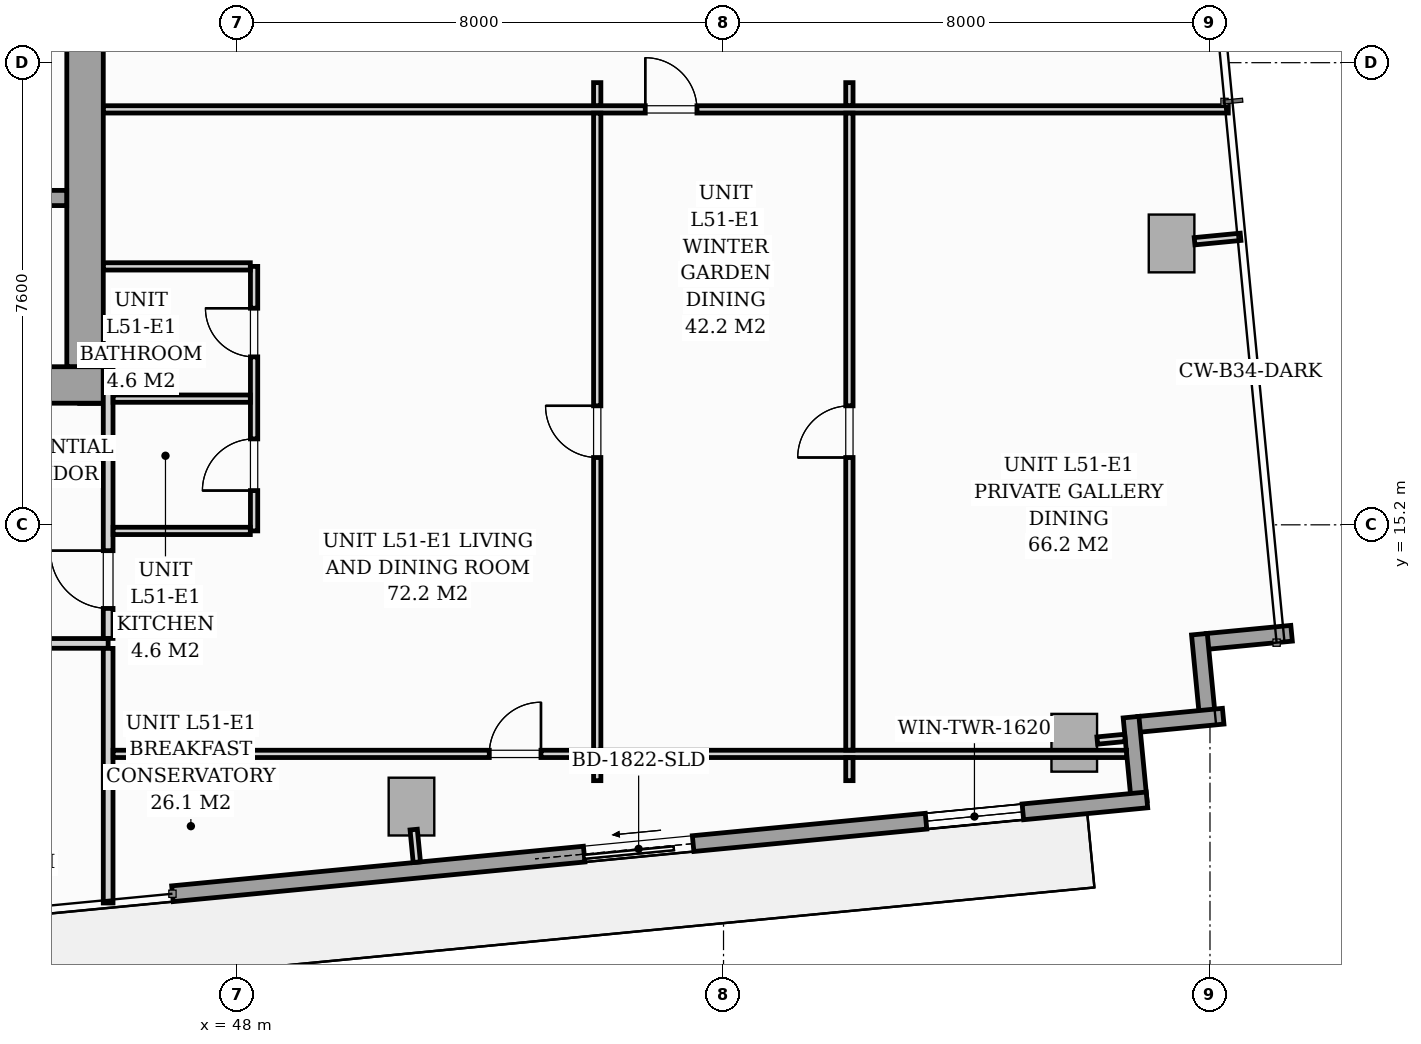
"""IFC4 building model, lengths in metres.
Left out: names, types, materials, properties, quantities, classifications, styles, units other than length and angle.
Written with IfcOpenShell. Run it as: python <this file> out.ifc"""

import sys

from ifc_helpers import new_model, si_unit, direction, frame, frame_2d, origin, origin_2d, place, context, subcontext, project, spatial, rectangle, i_section, extrude, source, transform, mapped, element, fill, save


model = new_model("IFC4")
c1 = context("Model", 3, precision=1e-05, world=origin(), true_north=direction((0.0, 1.0)))
c2 = subcontext(c1, "Body", "Model", "MODEL_VIEW")
j1 = project(units=[si_unit("LENGTHUNIT", "METRE"), si_unit("PLANEANGLEUNIT", "RADIAN")], contexts=[c1])
p1 = place(None, origin())
s1 = spatial("IfcSite", under=j1, at=p1, CompositionType="ELEMENT")
p2 = place(p1, origin())
s2 = spatial("IfcBuilding", under=s1, at=p2, CompositionType="ELEMENT")
p3 = place(p2, frame((0.0, 0.0, 179.4)))
s3 = spatial("IfcBuildingStorey", under=s2, at=p3, CompositionType="ELEMENT", Elevation=179.4)
m1 = source(origin(), c2, "Body", "SweptSolid", [
    extrude(i_section(OverallWidth=0.416, OverallDepth=0.446, WebThickness=0.039, FlangeThickness=0.063, FilletRadius=0.018, at=origin_2d()), origin(), (0.0, 0.0, 1.0), 3.196),
])
p4 = place(p3, frame((45.6, 17.4, 0.002), z_axis=(0.0, 0.0, 1.0), x_axis=(1.0, 0.0, 0.0)))
e1 = element("IfcColumn", 1, at=p4, inside=s3, PredefinedType="PILASTER", context=c2, shape_type="MappedRepresentation", body=[
    mapped(m1, transform((0.0, 0.0, 0.0), scale=1.0)),
])
m2 = source(origin(), c2, "Body", "SweptSolid", [
    extrude(rectangle(XDim=0.75, YDim=0.95, at=origin_2d()), origin(), (0.0, 0.0, 1.0), 3.196),
])
for number, where, z_axis, x_axis in (
    (2, (50.868, 10.566, 0.002), (0.0, 0.0, 1.0), (0.995, 0.096, 0.0)),
    (3, (61.768, 11.616, 0.002), (0.0, 0.0, 1.0), (0.995, 0.096, 0.0)),
    (4, (63.368, 19.827, 0.002), (0.0, 0.0, 1.0), (0.995, 0.096, 0.0)),
):
    element("IfcColumn", number, at=place(p3, frame(where, z_axis=z_axis, x_axis=x_axis)), inside=s3, PredefinedType="COLUMN", context=c2, shape_type="MappedRepresentation", body=[
        mapped(m2, transform((0.0, 0.0, 0.0), scale=1.0)),
    ])
p5 = place(p3, frame((65.342, 13.417, 0.0), z_axis=(0.0, 0.0, 1.0), x_axis=(-0.99540774648, -0.095725744959, 0.0)))
e5 = element("IfcWall", 5, at=p5, inside=s3, PredefinedType="STANDARD", context=c2, shape_type="SweptSolid", body=[
    extrude(rectangle(XDim=1.395, YDim=0.26, at=frame_2d((0.698, 0.0))), origin(), (0.0, 0.0, 1.0), 2.94),
])
p6 = place(p3, frame((63.826, 13.401, 0.0), z_axis=(0.0, 0.0, 1.0), x_axis=(0.095915846097, -0.995389446633, 0.0)))
e6 = element("IfcWall", 6, at=p6, inside=s3, PredefinedType="STANDARD", context=c2, shape_type="SweptSolid", body=[
    extrude(rectangle(XDim=1.395, YDim=0.26, at=frame_2d((0.697, 0.0))), origin(), (0.0, 0.0, 1.0), 2.94),
])
for number, where, z_axis, x_axis in (
    (7, (64.217, 12.053, 0.0), (0.0, 0.0, 1.0), (-0.995, -0.096, 0.0)),
    (8, (62.702, 12.037, 0.0), (0.0, 0.0, 1.0), (0.096, -0.995, 0.0)),
):
    element("IfcWall", number, at=place(p3, frame(where, z_axis=z_axis, x_axis=x_axis)), inside=s3, PredefinedType="STANDARD", context=c2, shape_type="SweptSolid", body=[
        extrude(rectangle(XDim=1.395, YDim=0.26, at=frame_2d((0.698, 0.0))), origin(), (0.0, 0.0, 1.0), 2.94),
    ])
p7 = place(p3, frame((62.963, 10.676, 0.0), z_axis=(0.0, 0.0, 1.0), x_axis=(-0.995395627913, -0.095851676732, 0.0)))
e9 = element("IfcWall", 9, at=p7, inside=s3, PredefinedType="STANDARD", context=c2, shape_type="SweptSolid", body=[
    extrude(rectangle(XDim=16.1, YDim=0.26, at=frame_2d((8.05, 0.0))), origin(), (0.0, 0.0, 1.0), 2.94),
])
p8 = place(p7, frame((7.498, 0.0, 0.0)))
e10 = element("IfcOpeningElement", 10, at=p8, cuts=e9, PredefinedType="OPENING", context=c2, shape_type="SweptSolid", body=[
    extrude(rectangle(XDim=1.8, YDim=2.06, at=frame_2d((0.9, 1.03))), frame((0.0, 0.14, 0.0), z_axis=(0.0, -1.0, 0.0), x_axis=(1.0, 0.0, 0.0)), (0.0, 0.0, 1.0), 0.28),
])
p9 = place(p7, frame((2.05, 0.0, 0.65)))
e11 = element("IfcOpeningElement", 11, at=p9, cuts=e9, PredefinedType="OPENING", context=c2, shape_type="SweptSolid", body=[
    extrude(rectangle(XDim=1.6, YDim=1.5, at=frame_2d((0.8, 0.75))), frame((0.0, 0.14, 0.0), z_axis=(0.0, -1.0, 0.0), x_axis=(1.0, 0.0, 0.0)), (0.0, 0.0, 1.0), 0.28),
])
p10 = place(p3, frame((26.2, 17.5, 0.0), z_axis=(0.0, 0.0, 1.0), x_axis=(1.0, 0.0, 0.0)))
e12 = element("IfcWall", 12, at=p10, inside=s3, PredefinedType="SHEAR", context=c2, shape_type="SweptSolid", body=[
    extrude(rectangle(XDim=19.6, YDim=0.6, at=frame_2d((9.8, 0.0))), origin(), (0.0, 0.0, 1.0), 3.2),
])
p11 = place(p10, frame((0.95, 0.0, 0.0)))
e13 = element("IfcOpeningElement", 13, at=p11, cuts=e12, PredefinedType="OPENING", context=c2, shape_type="SweptSolid", body=[
    extrude(rectangle(XDim=0.95, YDim=2.06, at=frame_2d((0.475, 1.03))), frame((0.0, 0.31, 0.0), z_axis=(0.0, -1.0, 0.0), x_axis=(1.0, 0.0, 0.0)), (0.0, 0.0, 1.0), 0.62),
])
p12 = place(p10, frame((9.38, 0.0, 0.0)))
e14 = element("IfcOpeningElement", 14, at=p12, cuts=e12, PredefinedType="OPENING", context=c2, shape_type="SweptSolid", body=[
    extrude(rectangle(XDim=0.85, YDim=2.0, at=frame_2d((0.425, 1.0))), frame((0.0, 0.31, 0.0), z_axis=(0.0, -1.0, 0.0), x_axis=(1.0, 0.0, 0.0)), (0.0, 0.0, 1.0), 0.62),
])
p13 = place(p10, frame((17.55, 0.0, 0.0)))
e15 = element("IfcOpeningElement", 15, at=p13, cuts=e12, PredefinedType="OPENING", context=c2, shape_type="SweptSolid", body=[
    extrude(rectangle(XDim=0.95, YDim=2.06, at=frame_2d((0.475, 1.03))), frame((0.0, 0.31, 0.0), z_axis=(0.0, -1.0, 0.0), x_axis=(1.0, 0.0, 0.0)), (0.0, 0.0, 1.0), 0.62),
])
p14 = place(p3, frame((45.5, 17.802, 0.0), z_axis=(0.0, 0.0, 1.0), x_axis=(0.0, 1.0, 0.0)))
e16 = element("IfcWall", 16, at=p14, inside=s3, PredefinedType="SHEAR", context=c2, shape_type="SweptSolid", body=[
    extrude(rectangle(XDim=5.796, YDim=0.6, at=frame_2d((2.898, 0.0))), origin(), (0.0, 0.0, 1.0), 3.2),
])
p15 = place(p3, frame((37.05, 20.575, 0.0), z_axis=(0.0, 0.0, 1.0), x_axis=(1.0, 0.0, 0.0)))
e17 = element("IfcWall", 17, at=p15, inside=s3, PredefinedType="SOLIDWALL", context=c2, shape_type="SweptSolid", body=[
    extrude(rectangle(XDim=8.148, YDim=0.25, at=frame_2d((4.074, 0.0))), origin(), (0.0, 0.0, 1.0), 3.2),
])
p16 = place(p15, frame((6.6, 0.0, 0.0)))
e18 = element("IfcOpeningElement", 18, at=p16, cuts=e17, PredefinedType="OPENING", context=c2, shape_type="SweptSolid", body=[
    extrude(rectangle(XDim=0.95, YDim=2.06, at=frame_2d((0.475, 1.03))), frame((0.0, 0.135, 0.0), z_axis=(0.0, -1.0, 0.0), x_axis=(1.0, 0.0, 0.0)), (0.0, 0.0, 1.0), 0.27),
])
p17 = place(p3, frame((22.6, 13.25, 0.0), z_axis=(0.0, 0.0, 1.0), x_axis=(1.0, 0.0, 0.0)))
e19 = element("IfcWall", 19, at=p17, inside=s3, PredefinedType="PARTITIONING", context=c2, shape_type="SweptSolid", body=[
    extrude(rectangle(XDim=23.28, YDim=0.16, at=frame_2d((11.64, 0.0))), origin(), (0.0, 0.0, 1.0), 2.94),
])
p18 = place(p17, frame((3.335, 0.0, 0.0)))
e20 = element("IfcOpeningElement", 20, at=p18, cuts=e19, PredefinedType="OPENING", context=c2, shape_type="SweptSolid", body=[
    extrude(rectangle(XDim=0.95, YDim=2.06, at=frame_2d((0.475, 1.03))), frame((0.0, 0.09, 0.0), z_axis=(0.0, -1.0, 0.0), x_axis=(1.0, 0.0, 0.0)), (0.0, 0.0, 1.0), 0.18),
])
p19 = place(p17, frame((15.096, 0.0, 0.0)))
e21 = element("IfcOpeningElement", 21, at=p19, cuts=e19, PredefinedType="OPENING", context=c2, shape_type="SweptSolid", body=[
    extrude(rectangle(XDim=0.95, YDim=2.06, at=frame_2d((0.475, 1.03))), frame((0.0, 0.09, 0.0), z_axis=(0.0, -1.0, 0.0), x_axis=(1.0, 0.0, 0.0)), (0.0, 0.0, 1.0), 0.18),
])
p20 = place(p3, frame((45.88, 8.981, 0.0), z_axis=(0.0, 0.0, 1.0), x_axis=(0.0, 1.0, 0.0)))
e22 = element("IfcWall", 22, at=p20, inside=s3, PredefinedType="PARTITIONING", context=c2, shape_type="SweptSolid", body=[
    extrude(rectangle(XDim=4.187, YDim=0.16, at=frame_2d((2.094, 0.0))), origin(), (0.0, 0.0, 1.0), 2.94),
])
p21 = place(p3, frame((45.88, 13.332, 0.0), z_axis=(0.0, 0.0, 1.0), x_axis=(0.0, 1.0, 0.0)))
e23 = element("IfcWall", 23, at=p21, inside=s3, PredefinedType="PARTITIONING", context=c2, shape_type="SweptSolid", body=[
    extrude(rectangle(XDim=4.47, YDim=0.16, at=frame_2d((2.235, 0.0))), origin(), (0.0, 0.0, 1.0), 2.94),
])
p22 = place(p21, frame((0.493, 0.0, 0.0)))
e24 = element("IfcOpeningElement", 24, at=p22, cuts=e23, PredefinedType="OPENING", context=c2, shape_type="SweptSolid", body=[
    extrude(rectangle(XDim=0.95, YDim=2.06, at=frame_2d((0.475, 1.03))), frame((0.0, 0.09, 0.0), z_axis=(0.0, -1.0, 0.0), x_axis=(1.0, 0.0, 0.0)), (0.0, 0.0, 1.0), 0.18),
])
p23 = place(p3, frame((48.28, 15.1, 0.0), z_axis=(0.0, 0.0, 1.0), x_axis=(0.0, 1.0, 0.0)))
e25 = element("IfcWall", 25, at=p23, inside=s3, PredefinedType="PARTITIONING", context=c2, shape_type="SweptSolid", body=[
    extrude(rectangle(XDim=4.35, YDim=0.12, at=frame_2d((2.175, 0.0))), origin(), (0.0, 0.0, 1.0), 2.94),
])
p24 = place(p23, frame((0.663, 0.0, 0.0)))
e26 = element("IfcOpeningElement", 26, at=p24, cuts=e25, PredefinedType="OPENING", context=c2, shape_type="SweptSolid", body=[
    extrude(rectangle(XDim=0.85, YDim=2.05, at=frame_2d((0.425, 1.025))), frame((0.0, 0.07, 0.0), z_axis=(0.0, -1.0, 0.0), x_axis=(1.0, 0.0, 0.0)), (0.0, 0.0, 1.0), 0.14),
])
p25 = place(p23, frame((2.862, 0.0, 0.0)))
e27 = element("IfcOpeningElement", 27, at=p25, cuts=e25, PredefinedType="OPENING", context=c2, shape_type="SweptSolid", body=[
    extrude(rectangle(XDim=0.8, YDim=2.02, at=frame_2d((0.4, 1.01))), frame((0.0, 0.07, 0.0), z_axis=(0.0, -1.0, 0.0), x_axis=(1.0, 0.0, 0.0)), (0.0, 0.0, 1.0), 0.14),
])
for number, where, z_axis, x_axis in (
    (28, (45.962, 17.275, 0.0), (0.0, 0.0, 1.0), (1.0, 0.0, 0.0)),
    (29, (45.962, 15.1, 0.0), (0.0, 0.0, 1.0), (1.0, 0.0, 0.0)),
):
    element("IfcWall", number, at=place(p3, frame(where, z_axis=z_axis, x_axis=x_axis)), inside=s3, PredefinedType="PARTITIONING", context=c2, shape_type="SweptSolid", body=[
        extrude(rectangle(XDim=2.256, YDim=0.12, at=frame_2d((1.128, 0.0))), origin(), (0.0, 0.0, 1.0), 2.94),
    ])
p26 = place(p3, frame((45.802, 19.45, 0.0), z_axis=(0.0, 0.0, 1.0), x_axis=(1.0, 0.0, 0.0)))
e30 = element("IfcWall", 30, at=p26, inside=s3, PredefinedType="PARTITIONING", context=c2, shape_type="SweptSolid", body=[
    extrude(rectangle(XDim=2.416, YDim=0.12, at=frame_2d((1.208, 0.0))), origin(), (0.0, 0.0, 1.0), 2.94),
])
p27 = place(p3, frame((45.802, 22.032, 0.0), z_axis=(0.0, 0.0, 1.0), x_axis=(1.0, 0.0, 0.0)))
e31 = element("IfcWall", 31, at=p27, inside=s3, PredefinedType="PARTITIONING", context=c2, shape_type="SweptSolid", body=[
    extrude(rectangle(XDim=18.499, YDim=0.12, at=frame_2d((9.25, 0.0))), origin(), (0.0, 0.0, 1.0), 2.94),
])
p28 = place(p27, frame((8.911, 0.0, 0.0)))
e32 = element("IfcOpeningElement", 32, at=p28, cuts=e31, PredefinedType="OPENING", context=c2, shape_type="SweptSolid", body=[
    extrude(rectangle(XDim=0.85, YDim=2.05, at=frame_2d((0.425, 1.025))), frame((0.0, 0.07, 0.0), z_axis=(0.0, -1.0, 0.0), x_axis=(1.0, 0.0, 0.0)), (0.0, 0.0, 1.0), 0.14),
])
p29 = place(p3, frame((45.962, 11.433, 0.0), z_axis=(0.0, 0.0, 1.0), x_axis=(1.0, 0.0, 0.0)))
e33 = element("IfcWall", 33, at=p29, inside=s3, PredefinedType="PARTITIONING", context=c2, shape_type="SweptSolid", body=[
    extrude(rectangle(XDim=16.666, YDim=0.12, at=frame_2d((8.333, 0.0))), origin(), (0.0, 0.0, 1.0), 2.383),
])
p30 = place(p29, frame((6.186, 0.0, 0.0)))
e34 = element("IfcOpeningElement", 34, at=p30, cuts=e33, PredefinedType="OPENING", context=c2, shape_type="SweptSolid", body=[
    extrude(rectangle(XDim=0.85, YDim=2.05, at=frame_2d((0.425, 1.025))), frame((0.0, 0.07, 0.0), z_axis=(0.0, -1.0, 0.0), x_axis=(1.0, 0.0, 0.0)), (0.0, 0.0, 1.0), 0.14),
])
p31 = place(p3, frame((58.07, 10.993, 0.0), z_axis=(0.0, 0.0, 1.0), x_axis=(0.0, 1.0, 0.0)))
e35 = element("IfcWall", 35, at=p31, inside=s3, PredefinedType="PARTITIONING", context=c2, shape_type="SweptSolid", body=[
    extrude(rectangle(XDim=0.378, YDim=0.12, at=frame_2d((0.189, 0.0))), origin(), (0.0, 0.0, 1.0), 2.94),
])
p32 = place(p3, frame((58.07, 11.495, 0.0), z_axis=(0.0, 0.0, 1.0), x_axis=(0.0, 1.0, 0.0)))
e36 = element("IfcWall", 36, at=p32, inside=s3, PredefinedType="PARTITIONING", context=c2, shape_type="SweptSolid", body=[
    extrude(rectangle(XDim=10.475, YDim=0.12, at=frame_2d((5.237, 0.0))), origin(), (0.0, 0.0, 1.0), 2.94),
])
p33 = place(p32, frame((4.812, 0.0, 0.0)))
e37 = element("IfcOpeningElement", 37, at=p33, cuts=e36, PredefinedType="OPENING", context=c2, shape_type="SweptSolid", body=[
    extrude(rectangle(XDim=0.85, YDim=2.05, at=frame_2d((0.425, 1.025))), frame((0.0, 0.07, 0.0), z_axis=(0.0, -1.0, 0.0), x_axis=(1.0, 0.0, 0.0)), (0.0, 0.0, 1.0), 0.14),
])
p34 = place(p3, frame((58.07, 22.094, 0.0), z_axis=(0.0, 0.0, 1.0), x_axis=(0.0, 1.0, 0.0)))
e38 = element("IfcWall", 38, at=p34, inside=s3, PredefinedType="PARTITIONING", context=c2, shape_type="SweptSolid", body=[
    extrude(rectangle(XDim=0.378, YDim=0.12, at=frame_2d((0.189, 0.0))), origin(), (0.0, 0.0, 1.0), 2.94),
])
p35 = place(p3, frame((53.923, 10.993, 0.0), z_axis=(0.0, 0.0, 1.0), x_axis=(0.0, 1.0, 0.0)))
e39 = element("IfcWall", 39, at=p35, inside=s3, PredefinedType="PARTITIONING", context=c2, shape_type="SweptSolid", body=[
    extrude(rectangle(XDim=0.378, YDim=0.12, at=frame_2d((0.189, 0.0))), origin(), (0.0, 0.0, 1.0), 2.94),
])
p36 = place(p3, frame((53.923, 11.495, 0.0), z_axis=(0.0, 0.0, 1.0), x_axis=(0.0, 1.0, 0.0)))
e40 = element("IfcWall", 40, at=p36, inside=s3, PredefinedType="PARTITIONING", context=c2, shape_type="SweptSolid", body=[
    extrude(rectangle(XDim=10.475, YDim=0.12, at=frame_2d((5.237, 0.0))), origin(), (0.0, 0.0, 1.0), 2.94),
])
p37 = place(p36, frame((4.812, 0.0, 0.0)))
e41 = element("IfcOpeningElement", 41, at=p37, cuts=e40, PredefinedType="OPENING", context=c2, shape_type="SweptSolid", body=[
    extrude(rectangle(XDim=0.85, YDim=2.05, at=frame_2d((0.425, 1.025))), frame((0.0, 0.07, 0.0), z_axis=(0.0, -1.0, 0.0), x_axis=(1.0, 0.0, 0.0)), (0.0, 0.0, 1.0), 0.14),
])
p38 = place(p3, frame((53.923, 22.094, 0.0), z_axis=(0.0, 0.0, 1.0), x_axis=(0.0, 1.0, 0.0)))
e42 = element("IfcWall", 42, at=p38, inside=s3, PredefinedType="PARTITIONING", context=c2, shape_type="SweptSolid", body=[
    extrude(rectangle(XDim=0.378, YDim=0.12, at=frame_2d((0.189, 0.0))), origin(), (0.0, 0.0, 1.0), 2.94),
])
p39 = place(p3, frame((50.905, 10.188, 0.0), z_axis=(0.0, 0.0, 1.0), x_axis=(0.095772948675, -0.995403205893, 0.0)))
e43 = element("IfcWall", 43, at=p39, inside=s3, PredefinedType="PARTITIONING", context=c2, shape_type="SweptSolid", body=[
    extrude(rectangle(XDim=0.538, YDim=0.12, at=frame_2d((0.269, 0.0))), origin(), (0.0, 0.0, 1.0), 2.94),
])
p40 = place(p3, frame((62.146, 11.652, 0.0), z_axis=(0.0, 0.0, 1.0), x_axis=(0.995384576284, 0.09596637586, 0.0)))
e44 = element("IfcWall", 44, at=p40, inside=s3, PredefinedType="PARTITIONING", context=c2, shape_type="SweptSolid", body=[
    extrude(rectangle(XDim=0.458, YDim=0.12, at=frame_2d((0.229, 0.0))), origin(), (0.0, 0.0, 1.0), 2.94),
])
p41 = place(p3, frame((63.747, 19.864, 0.0), z_axis=(0.0, 0.0, 1.0), x_axis=(0.995405496295, 0.095749140702, 0.0)))
e45 = element("IfcWall", 45, at=p41, inside=s3, PredefinedType="PARTITIONING", context=c2, shape_type="SweptSolid", body=[
    extrude(rectangle(XDim=0.76, YDim=0.12, at=frame_2d((0.38, 0.0))), origin(), (0.0, 0.0, 1.0), 2.94),
])
m3 = source(origin(), c2, "Body", "SweptSolid", [
    extrude(rectangle(XDim=1.8, YDim=2.06, at=frame_2d((0.9, 1.03))), frame((0.0, 0.025, 0.0), z_axis=(0.0, -1.0, 0.0), x_axis=(1.0, 0.0, 0.0)), (0.0, 0.0, 1.0), 0.05),
])
p42 = place(p8, origin())
e46 = element("IfcDoor", 46, at=p42, inside=s3, OperationType="SLIDING_TO_RIGHT", PredefinedType="DOOR", context=c2, shape_type="MappedRepresentation", body=[
    mapped(m3, transform((0.0, 0.0, 0.0), scale=1.0)),
])
fill(e10, e46)
m4 = source(origin(), c2, "Body", "SweptSolid", [
    extrude(rectangle(XDim=1.6, YDim=1.5, at=frame_2d((0.8, 0.75))), frame((0.0, 0.03, 0.0), z_axis=(0.0, -1.0, 0.0), x_axis=(1.0, 0.0, 0.0)), (0.0, 0.0, 1.0), 0.06),
])
p43 = place(p9, origin())
e47 = element("IfcWindow", 47, at=p43, inside=s3, PartitioningType="SINGLE_PANEL", PredefinedType="WINDOW", context=c2, shape_type="MappedRepresentation", body=[
    mapped(m4, transform((0.0, 0.0, 0.0), scale=1.0)),
])
fill(e11, e47)
m5 = source(origin(), c2, "Body", "SweptSolid", [
    extrude(rectangle(XDim=0.95, YDim=2.06, at=frame_2d((0.475, 1.03))), frame((0.0, 0.025, 0.0), z_axis=(0.0, -1.0, 0.0), x_axis=(1.0, 0.0, 0.0)), (0.0, 0.0, 1.0), 0.05),
])
p44 = place(p22, origin())
e48 = element("IfcDoor", 48, at=p44, inside=s3, OperationType="SINGLE_SWING_RIGHT", PredefinedType="DOOR", context=c2, shape_type="MappedRepresentation", body=[
    mapped(m5, transform((0.0, 0.0, 0.0), scale=1.0)),
])
fill(e24, e48)
m6 = source(origin(), c2, "Body", "SweptSolid", [
    extrude(rectangle(XDim=0.85, YDim=2.05, at=frame_2d((0.425, 1.025))), frame((0.0, 0.025, 0.0), z_axis=(0.0, -1.0, 0.0), x_axis=(1.0, 0.0, 0.0)), (0.0, 0.0, 1.0), 0.05),
])
p45 = place(p24, origin())
e49 = element("IfcDoor", 49, at=p45, inside=s3, OperationType="SINGLE_SWING_LEFT", PredefinedType="DOOR", context=c2, shape_type="MappedRepresentation", body=[
    mapped(m6, transform((0.0, 0.0, 0.0), scale=1.0)),
])
fill(e26, e49)
m7 = source(origin(), c2, "Body", "SweptSolid", [
    extrude(rectangle(XDim=0.8, YDim=2.02, at=frame_2d((0.4, 1.01))), frame((0.0, 0.025, 0.0), z_axis=(0.0, -1.0, 0.0), x_axis=(1.0, 0.0, 0.0)), (0.0, 0.0, 1.0), 0.05),
])
p46 = place(p25, origin())
e50 = element("IfcDoor", 50, at=p46, inside=s3, OperationType="SINGLE_SWING_RIGHT", PredefinedType="DOOR", context=c2, shape_type="MappedRepresentation", body=[
    mapped(m7, transform((0.0, 0.0, 0.0), scale=1.0)),
])
fill(e27, e50)
p47 = place(p28, origin())
e51 = element("IfcDoor", 51, at=p47, inside=s3, OperationType="SINGLE_SWING_LEFT", PredefinedType="DOOR", context=c2, shape_type="MappedRepresentation", body=[
    mapped(m6, transform((0.0, 0.0, 0.0), scale=1.0)),
])
fill(e32, e51)
p48 = place(p30, origin())
e52 = element("IfcDoor", 52, at=p48, inside=s3, OperationType="SINGLE_SWING_RIGHT", PredefinedType="DOOR", context=c2, shape_type="MappedRepresentation", body=[
    mapped(m6, transform((0.0, 0.0, 0.0), scale=1.0)),
])
fill(e34, e52)
p49 = place(p33, origin())
e53 = element("IfcDoor", 53, at=p49, inside=s3, OperationType="SINGLE_SWING_LEFT", PredefinedType="DOOR", context=c2, shape_type="MappedRepresentation", body=[
    mapped(m6, transform((0.0, 0.0, 0.0), scale=1.0)),
])
fill(e37, e53)
p50 = place(p37, origin())
e54 = element("IfcDoor", 54, at=p50, inside=s3, OperationType="SINGLE_SWING_RIGHT", PredefinedType="DOOR", context=c2, shape_type="MappedRepresentation", body=[
    mapped(m6, transform((0.0, 0.0, 0.0), scale=1.0)),
])
fill(e41, e54)
save(model, sys.argv[1])
